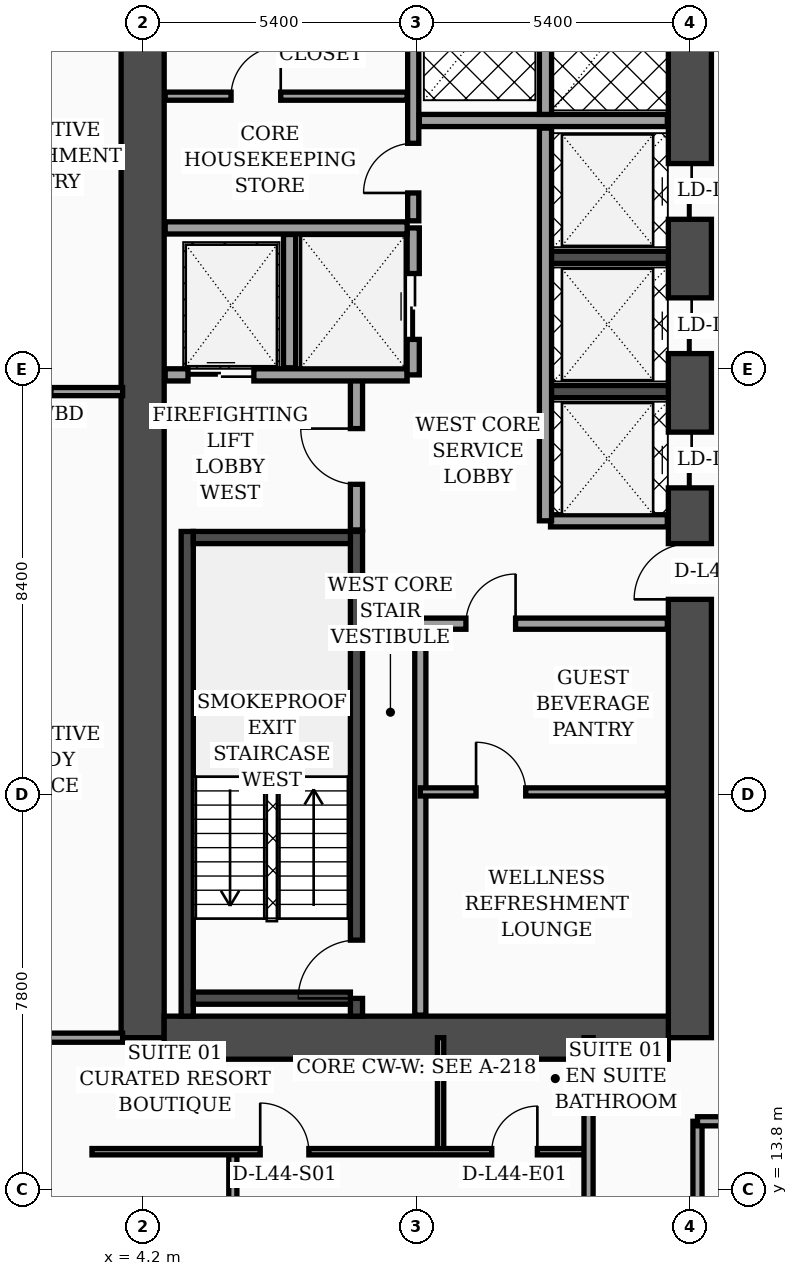
"""IFC4 building model, lengths in metres.
Left out: names, types, materials, properties, quantities, classifications, styles, units other than length and angle.
Written with IfcOpenShell. Run it as: python <this file> out.ifc"""

import sys

from ifc_helpers import new_model, si_unit, direction, frame, frame_2d, origin, place, context, subcontext, project, spatial, rectangle, extrude, element, fill, save


model = new_model("IFC4")
c1 = context("Model", 3, precision=1e-05, world=origin(), true_north=direction((0.0, 1.0)))
c2 = subcontext(c1, "Body", "Model", "MODEL_VIEW")
j1 = project(units=[si_unit("LENGTHUNIT", "METRE"), si_unit("PLANEANGLEUNIT", "RADIAN")], contexts=[c1])
p1 = place(None, origin())
s1 = spatial("IfcSite", under=j1, at=p1, CompositionType="ELEMENT")
p2 = place(p1, origin())
s2 = spatial("IfcBuilding", under=s1, at=p2, CompositionType="ELEMENT")
p3 = place(p2, frame((0.0, 0.0, 178.9)))
s3 = spatial("IfcBuildingStorey", under=s2, at=p3, CompositionType="ELEMENT", Elevation=178.9)
p4 = place(p3, frame((4.2, 16.8, 0.0), z_axis=(0.0, 0.0, 1.0), x_axis=(0.0, 1.0, 0.0)))
e1 = element("IfcWall", 1, at=p4, inside=s3, PredefinedType="SHEAR", context=c2, shape_type="SweptSolid", body=[
    extrude(rectangle(XDim=21.6, YDim=0.85, at=frame_2d((10.8, 0.0))), origin(), (0.0, 0.0, 1.0), 3.56),
])
p5 = place(p3, frame((15.0, 16.8, 0.0), z_axis=(0.0, 0.0, 1.0), x_axis=(0.0, 1.0, 0.0)))
e2 = element("IfcWall", 2, at=p5, inside=s3, PredefinedType="SHEAR", context=c2, shape_type="SweptSolid", body=[
    extrude(rectangle(XDim=21.6, YDim=0.85, at=frame_2d((10.8, 0.0))), origin(), (0.0, 0.0, 1.0), 3.56),
])
p6 = place(p5, frame((8.65, 0.0, 0.0)))
e3 = element("IfcOpeningElement", 3, at=p6, cuts=e2, PredefinedType="OPENING", context=c2, shape_type="SweptSolid", body=[
    extrude(rectangle(XDim=1.1, YDim=2.2, at=frame_2d((0.55, 1.1))), frame((0.0, 0.435, 0.0), z_axis=(0.0, -1.0, 0.0), x_axis=(1.0, 0.0, 0.0)), (0.0, 0.0, 1.0), 0.87),
])
p7 = place(p5, frame((10.85, 0.0, 0.0)))
e4 = element("IfcOpeningElement", 4, at=p7, cuts=e2, PredefinedType="OPENING", context=c2, shape_type="SweptSolid", body=[
    extrude(rectangle(XDim=1.1, YDim=2.2, at=frame_2d((0.55, 1.1))), frame((0.0, 0.435, 0.0), z_axis=(0.0, -1.0, 0.0), x_axis=(1.0, 0.0, 0.0)), (0.0, 0.0, 1.0), 0.87),
])
p8 = place(p5, frame((13.5, 0.0, 0.0)))
e5 = element("IfcOpeningElement", 5, at=p8, cuts=e2, PredefinedType="OPENING", context=c2, shape_type="SweptSolid", body=[
    extrude(rectangle(XDim=1.1, YDim=2.2, at=frame_2d((0.55, 1.1))), frame((0.0, 0.435, 0.0), z_axis=(0.0, -1.0, 0.0), x_axis=(1.0, 0.0, 0.0)), (0.0, 0.0, 1.0), 0.87),
])
p9 = place(p5, frame((16.15, 0.0, 0.0)))
e6 = element("IfcOpeningElement", 6, at=p9, cuts=e2, PredefinedType="OPENING", context=c2, shape_type="SweptSolid", body=[
    extrude(rectangle(XDim=1.1, YDim=2.2, at=frame_2d((0.55, 1.1))), frame((0.0, 0.435, 0.0), z_axis=(0.0, -1.0, 0.0), x_axis=(1.0, 0.0, 0.0)), (0.0, 0.0, 1.0), 0.87),
])
p10 = place(p3, frame((4.625, 16.8, 0.0), z_axis=(0.0, 0.0, 1.0), x_axis=(1.0, 0.0, 0.0)))
e7 = element("IfcWall", 7, at=p10, inside=s3, PredefinedType="SHEAR", context=c2, shape_type="SweptSolid", body=[
    extrude(rectangle(XDim=9.95, YDim=0.85, at=frame_2d((4.975, 0.0))), origin(), (0.0, 0.0, 1.0), 3.56),
])
p11 = place(p3, frame((5.08, 17.225, 0.0), z_axis=(0.0, 0.0, 1.0), x_axis=(0.0, 1.0, 0.0)))
e8 = element("IfcWall", 8, at=p11, inside=s3, PredefinedType="SOLIDWALL", context=c2, shape_type="SweptSolid", body=[
    extrude(rectangle(XDim=9.565, YDim=0.24, at=frame_2d((4.782, 0.0))), origin(), (0.0, 0.0, 1.0), 3.56),
])
p12 = place(p3, frame((8.42, 17.225, 0.0), z_axis=(0.0, 0.0, 1.0), x_axis=(0.0, 1.0, 0.0)))
e9 = element("IfcWall", 9, at=p12, inside=s3, PredefinedType="SOLIDWALL", context=c2, shape_type="SweptSolid", body=[
    extrude(rectangle(XDim=9.565, YDim=0.24, at=frame_2d((4.782, 0.0))), origin(), (0.0, 0.0, 1.0), 3.56),
])
p13 = place(p12, frame((0.35, 0.0, 0.0)))
e10 = element("IfcOpeningElement", 10, at=p13, cuts=e9, PredefinedType="OPENING", context=c2, shape_type="SweptSolid", body=[
    extrude(rectangle(XDim=1.15, YDim=2.2, at=frame_2d((0.575, 1.1))), frame((0.0, 0.13, 0.0), z_axis=(0.0, -1.0, 0.0), x_axis=(1.0, 0.0, 0.0)), (0.0, 0.0, 1.0), 0.26),
])
for number, where, z_axis, x_axis in (
    (11, (5.2, 17.58, 0.0), (0.0, 0.0, 1.0), (1.0, 0.0, 0.0)),
    (12, (5.2, 26.67, 0.0), (0.0, 0.0, 1.0), (1.0, 0.0, 0.0)),
):
    element("IfcWall", number, at=place(p3, frame(where, z_axis=z_axis, x_axis=x_axis)), inside=s3, PredefinedType="SOLIDWALL", context=c2, shape_type="SweptSolid", body=[
        extrude(rectangle(XDim=3.1, YDim=0.24, at=frame_2d((1.55, 0.0))), origin(), (0.0, 0.0, 1.0), 3.56),
    ])
for number, where, z_axis, x_axis in (
    (13, (12.18, 29.55, 0.0), (0.0, 0.0, 1.0), (1.0, 0.0, 0.0)),
    (14, (12.18, 32.2, 0.0), (0.0, 0.0, 1.0), (1.0, 0.0, 0.0)),
):
    element("IfcWall", number, at=place(p3, frame(where, z_axis=z_axis, x_axis=x_axis)), inside=s3, PredefinedType="SOLIDWALL", context=c2, shape_type="SweptSolid", body=[
        extrude(rectangle(XDim=2.395, YDim=0.24, at=frame_2d((1.198, 0.0))), origin(), (0.0, 0.0, 1.0), 3.56),
    ])
p14 = place(p3, frame((8.42, 26.82, 0.0), z_axis=(0.0, 0.0, 1.0), x_axis=(0.0, 1.0, 0.0)))
e15 = element("IfcWall", 15, at=p14, inside=s3, PredefinedType="SOLIDWALL", context=c2, shape_type="SweptSolid", body=[
    extrude(rectangle(XDim=3.0, YDim=0.24, at=frame_2d((1.5, 0.0))), origin(), (0.0, 0.0, 1.0), 3.56),
])
p15 = place(p14, frame((0.9, 0.0, 0.0)))
e16 = element("IfcOpeningElement", 16, at=p15, cuts=e15, PredefinedType="OPENING", context=c2, shape_type="SweptSolid", body=[
    extrude(rectangle(XDim=1.1, YDim=2.2, at=frame_2d((0.55, 1.1))), frame((0.0, 0.13, 0.0), z_axis=(0.0, -1.0, 0.0), x_axis=(1.0, 0.0, 0.0)), (0.0, 0.0, 1.0), 0.26),
])
p16 = place(p3, frame((4.645, 29.88, 0.0), z_axis=(0.0, 0.0, 1.0), x_axis=(1.0, 0.0, 0.0)))
e17 = element("IfcWall", 17, at=p16, inside=s3, PredefinedType="SOLIDWALL", context=c2, shape_type="SweptSolid", body=[
    extrude(rectangle(XDim=4.775, YDim=0.24, at=frame_2d((2.387, 0.0))), origin(), (0.0, 0.0, 1.0), 3.56),
])
p17 = place(p16, frame((0.45, 0.0, 0.0)))
e18 = element("IfcOpeningElement", 18, at=p17, cuts=e17, PredefinedType="OPENING", context=c2, shape_type="SweptSolid", body=[
    extrude(rectangle(XDim=1.3, YDim=2.35, at=frame_2d((0.65, 1.175))), frame((0.0, 0.13, 0.0), z_axis=(0.0, -1.0, 0.0), x_axis=(1.0, 0.0, 0.0)), (0.0, 0.0, 1.0), 0.26),
])
p18 = place(p3, frame((7.1, 30.02, 0.0), z_axis=(0.0, 0.0, 1.0), x_axis=(0.0, 1.0, 0.0)))
e19 = element("IfcWall", 19, at=p18, inside=s3, PredefinedType="SOLIDWALL", context=c2, shape_type="SweptSolid", body=[
    extrude(rectangle(XDim=2.63, YDim=0.24, at=frame_2d((1.315, 0.0))), origin(), (0.0, 0.0, 1.0), 3.56),
])
p19 = place(p3, frame((9.54, 29.88, 0.0), z_axis=(0.0, 0.0, 1.0), x_axis=(0.0, 1.0, 0.0)))
e20 = element("IfcWall", 20, at=p19, inside=s3, PredefinedType="SOLIDWALL", context=c2, shape_type="SweptSolid", body=[
    extrude(rectangle(XDim=2.9, YDim=0.24, at=frame_2d((1.45, 0.0))), origin(), (0.0, 0.0, 1.0), 3.56),
])
p20 = place(p19, frame((0.7, 0.0, 0.0)))
e21 = element("IfcOpeningElement", 21, at=p20, cuts=e20, PredefinedType="OPENING", context=c2, shape_type="SweptSolid", body=[
    extrude(rectangle(XDim=1.3, YDim=2.35, at=frame_2d((0.65, 1.175))), frame((0.0, 0.13, 0.0), z_axis=(0.0, -1.0, 0.0), x_axis=(1.0, 0.0, 0.0)), (0.0, 0.0, 1.0), 0.26),
])
p21 = place(p3, frame((4.645, 32.78, 0.0), z_axis=(0.0, 0.0, 1.0), x_axis=(1.0, 0.0, 0.0)))
e22 = element("IfcWall", 22, at=p21, inside=s3, PredefinedType="SOLIDWALL", context=c2, shape_type="SweptSolid", body=[
    extrude(rectangle(XDim=4.775, YDim=0.24, at=frame_2d((2.387, 0.0))), origin(), (0.0, 0.0, 1.0), 3.19),
])
p22 = place(p3, frame((9.68, 17.245, 0.0), z_axis=(0.0, 0.0, 1.0), x_axis=(0.0, 1.0, 0.0)))
e23 = element("IfcWall", 23, at=p22, inside=s3, PredefinedType="SOLIDWALL", context=c2, shape_type="SweptSolid", body=[
    extrude(rectangle(XDim=7.755, YDim=0.22, at=frame_2d((3.877, 0.0))), origin(), (0.0, 0.0, 1.0), 3.56),
])
p23 = place(p3, frame((4.645, 35.38, 0.0), z_axis=(0.0, 0.0, 1.0), x_axis=(1.0, 0.0, 0.0)))
e24 = element("IfcWall", 24, at=p23, inside=s3, PredefinedType="PARTITIONING", context=c2, shape_type="SweptSolid", body=[
    extrude(rectangle(XDim=4.775, YDim=0.16, at=frame_2d((2.387, 0.0))), origin(), (0.0, 0.0, 1.0), 3.56),
])
p24 = place(p23, frame((1.3, 0.0, 0.0)))
e25 = element("IfcOpeningElement", 25, at=p24, cuts=e24, PredefinedType="OPENING", context=c2, shape_type="SweptSolid", body=[
    extrude(rectangle(XDim=0.98, YDim=2.15, at=frame_2d((0.49, 1.075))), frame((0.0, 0.09, 0.0), z_axis=(0.0, -1.0, 0.0), x_axis=(1.0, 0.0, 0.0)), (0.0, 0.0, 1.0), 0.18),
])
p25 = place(p3, frame((9.54, 32.92, 0.0), z_axis=(0.0, 0.0, 1.0), x_axis=(0.0, 1.0, 0.0)))
e26 = element("IfcWall", 26, at=p25, inside=s3, PredefinedType="SOLIDWALL", context=c2, shape_type="SweptSolid", body=[
    extrude(rectangle(XDim=5.035, YDim=0.22, at=frame_2d((2.518, 0.0))), origin(), (0.0, 0.0, 1.0), 3.56),
])
p26 = place(p25, frame((0.55, 0.0, 0.0)))
e27 = element("IfcOpeningElement", 27, at=p26, cuts=e26, PredefinedType="OPENING", context=c2, shape_type="SweptSolid", body=[
    extrude(rectangle(XDim=0.98, YDim=2.15, at=frame_2d((0.49, 1.075))), frame((0.0, 0.12, 0.0), z_axis=(0.0, -1.0, 0.0), x_axis=(1.0, 0.0, 0.0)), (0.0, 0.0, 1.0), 0.24),
])
p27 = place(p3, frame((9.68, 21.65, 0.0), z_axis=(0.0, 0.0, 1.0), x_axis=(1.0, 0.0, 0.0)))
e28 = element("IfcWall", 28, at=p27, inside=s3, PredefinedType="PARTITIONING", context=c2, shape_type="SweptSolid", body=[
    extrude(rectangle(XDim=4.875, YDim=0.16, at=frame_2d((2.438, 0.0))), origin(), (0.0, 0.0, 1.0), 3.09),
])
p28 = place(p27, frame((1.1, 0.0, 0.0)))
e29 = element("IfcOpeningElement", 29, at=p28, cuts=e28, PredefinedType="OPENING", context=c2, shape_type="SweptSolid", body=[
    extrude(rectangle(XDim=0.98, YDim=2.15, at=frame_2d((0.49, 1.075))), frame((0.0, 0.09, 0.0), z_axis=(0.0, -1.0, 0.0), x_axis=(1.0, 0.0, 0.0)), (0.0, 0.0, 1.0), 0.18),
])
p29 = place(p3, frame((9.68, 24.97, 0.0), z_axis=(0.0, 0.0, 1.0), x_axis=(1.0, 0.0, 0.0)))
e30 = element("IfcWall", 30, at=p29, inside=s3, PredefinedType="SOLIDWALL", context=c2, shape_type="SweptSolid", body=[
    extrude(rectangle(XDim=4.875, YDim=0.22, at=frame_2d((2.438, 0.0))), origin(), (0.0, 0.0, 1.0), 2.94),
])
p30 = place(p29, frame((0.9, 0.0, 0.0)))
e31 = element("IfcOpeningElement", 31, at=p30, cuts=e30, PredefinedType="OPENING", context=c2, shape_type="SweptSolid", body=[
    extrude(rectangle(XDim=0.98, YDim=2.15, at=frame_2d((0.49, 1.075))), frame((0.0, 0.12, 0.0), z_axis=(0.0, -1.0, 0.0), x_axis=(1.0, 0.0, 0.0)), (0.0, 0.0, 1.0), 0.24),
])
p31 = place(p3, frame((12.25, 27.0, 0.0), z_axis=(0.0, 0.0, 1.0), x_axis=(1.0, 0.0, 0.0)))
e32 = element("IfcWall", 32, at=p31, inside=s3, PredefinedType="SOLIDWALL", context=c2, shape_type="SweptSolid", body=[
    extrude(rectangle(XDim=2.305, YDim=0.24, at=frame_2d((1.152, 0.0))), origin(), (0.0, 0.0, 1.0), 3.56),
])
p32 = place(p3, frame((12.15, 27.0, 0.0), z_axis=(0.0, 0.0, 1.0), x_axis=(0.0, 1.0, 0.0)))
e33 = element("IfcWall", 33, at=p32, inside=s3, PredefinedType="SOLIDWALL", context=c2, shape_type="SweptSolid", body=[
    extrude(rectangle(XDim=7.75, YDim=0.24, at=frame_2d((3.875, 0.0))), origin(), (0.0, 0.0, 1.0), 3.56),
])
p33 = place(p3, frame((9.66, 34.9, 0.0), z_axis=(0.0, 0.0, 1.0), x_axis=(1.0, 0.0, 0.0)))
e34 = element("IfcWall", 34, at=p33, inside=s3, PredefinedType="SOLIDWALL", context=c2, shape_type="SweptSolid", body=[
    extrude(rectangle(XDim=4.895, YDim=0.24, at=frame_2d((2.448, 0.0))), origin(), (0.0, 0.0, 1.0), 3.56),
])
p34 = place(p3, frame((12.15, 35.02, 0.0), z_axis=(0.0, 0.0, 1.0), x_axis=(0.0, 1.0, 0.0)))
e35 = element("IfcWall", 35, at=p34, inside=s3, PredefinedType="SOLIDWALL", context=c2, shape_type="SweptSolid", body=[
    extrude(rectangle(XDim=2.935, YDim=0.24, at=frame_2d((1.468, 0.0))), origin(), (0.0, 0.0, 1.0), 3.56),
])
p35 = place(p3, frame((0.08, 29.55, 0.0), z_axis=(0.0, 0.0, 1.0), x_axis=(1.0, 0.0, 0.0)))
e36 = element("IfcWall", 36, at=p35, inside=s3, PredefinedType="PARTITIONING", context=c2, shape_type="SweptSolid", body=[
    extrude(rectangle(XDim=3.725, YDim=0.16, at=frame_2d((1.862, 0.0))), origin(), (0.0, 0.0, 1.0), 3.04),
])
p36 = place(p35, frame((1.35, 0.0, 0.0)))
e37 = element("IfcOpeningElement", 37, at=p36, cuts=e36, PredefinedType="OPENING", context=c2, shape_type="SweptSolid", body=[
    extrude(rectangle(XDim=0.96, YDim=2.2, at=frame_2d((0.48, 1.1))), frame((0.0, 0.09, 0.0), z_axis=(0.0, -1.0, 0.0), x_axis=(1.0, 0.0, 0.0)), (0.0, 0.0, 1.0), 0.18),
])
p37 = place(p3, frame((0.08, 16.8, 0.0), z_axis=(0.0, 0.0, 1.0), x_axis=(1.0, 0.0, 0.0)))
e38 = element("IfcWall", 38, at=p37, inside=s3, PredefinedType="PARTITIONING", context=c2, shape_type="SweptSolid", body=[
    extrude(rectangle(XDim=3.725, YDim=0.18, at=frame_2d((1.862, 0.0))), origin(), (0.0, 0.0, 1.0), 2.94),
])
p38 = place(p3, frame((10.08, 14.55, 0.0), z_axis=(0.0, 0.0, 1.0), x_axis=(0.0, 1.0, 0.0)))
e39 = element("IfcWall", 39, at=p38, inside=s3, PredefinedType="PARTITIONING", context=c2, shape_type="SweptSolid", body=[
    extrude(rectangle(XDim=2.25, YDim=0.125, at=frame_2d((1.125, 0.0))), origin(), (0.0, 0.0, 1.0), 3.56),
])
p39 = place(p3, frame((5.98, 2.44, 0.0), z_axis=(0.0, 0.0, 1.0), x_axis=(0.0, 1.0, 0.0)))
e40 = element("IfcWall", 40, at=p39, inside=s3, PredefinedType="PARTITIONING", context=c2, shape_type="SweptSolid", body=[
    extrude(rectangle(XDim=12.11, YDim=0.16, at=frame_2d((6.055, 0.0))), origin(), (0.0, 0.0, 1.0), 3.04),
])
p40 = place(p39, frame((5.58, 0.0, 0.0)))
e41 = element("IfcOpeningElement", 41, at=p40, cuts=e40, PredefinedType="OPENING", context=c2, shape_type="SweptSolid", body=[
    extrude(rectangle(XDim=0.96, YDim=2.2, at=frame_2d((0.48, 1.1))), frame((0.0, 0.09, 0.0), z_axis=(0.0, -1.0, 0.0), x_axis=(1.0, 0.0, 0.0)), (0.0, 0.0, 1.0), 0.18),
])
p41 = place(p3, frame((3.2, 14.55, 0.0), z_axis=(0.0, 0.0, 1.0), x_axis=(1.0, 0.0, 0.0)))
e42 = element("IfcWall", 42, at=p41, inside=s3, PredefinedType="PARTITIONING", context=c2, shape_type="SweptSolid", body=[
    extrude(rectangle(XDim=9.8, YDim=0.125, at=frame_2d((4.9, 0.0))), origin(), (0.0, 0.0, 1.0), 2.94),
])
p42 = place(p41, frame((3.32, 0.0, 0.0)))
e43 = element("IfcOpeningElement", 43, at=p42, cuts=e42, PredefinedType="OPENING", context=c2, shape_type="SweptSolid", body=[
    extrude(rectangle(XDim=0.96, YDim=2.2, at=frame_2d((0.48, 1.1))), frame((0.0, 0.073, 0.0), z_axis=(0.0, -1.0, 0.0), x_axis=(1.0, 0.0, 0.0)), (0.0, 0.0, 1.0), 0.145),
])
p43 = place(p41, frame((7.89, 0.0, 0.0)))
e44 = element("IfcOpeningElement", 44, at=p43, cuts=e42, PredefinedType="OPENING", context=c2, shape_type="SweptSolid", body=[
    extrude(rectangle(XDim=0.9, YDim=2.15, at=frame_2d((0.45, 1.075))), frame((0.0, 0.073, 0.0), z_axis=(0.0, -1.0, 0.0), x_axis=(1.0, 0.0, 0.0)), (0.0, 0.0, 1.0), 0.145),
])
p44 = place(p3, frame((13.0, 2.44, 0.0), z_axis=(0.0, 0.0, 1.0), x_axis=(0.0, 1.0, 0.0)))
e45 = element("IfcWall", 45, at=p44, inside=s3, PredefinedType="PARTITIONING", context=c2, shape_type="SweptSolid", body=[
    extrude(rectangle(XDim=14.36, YDim=0.18, at=frame_2d((7.18, 0.0))), origin(), (0.0, 0.0, 1.0), 2.94),
])
p45 = place(p44, frame((3.01, 0.0, 0.0)))
e46 = element("IfcOpeningElement", 46, at=p45, cuts=e45, PredefinedType="OPENING", context=c2, shape_type="SweptSolid", body=[
    extrude(rectangle(XDim=1.02, YDim=2.2, at=frame_2d((0.51, 1.1))), frame((0.0, 0.1, 0.0), z_axis=(0.0, -1.0, 0.0), x_axis=(1.0, 0.0, 0.0)), (0.0, 0.0, 1.0), 0.2),
])
p46 = place(p3, frame((15.15, 2.44, 0.0), z_axis=(0.0, 0.0, 1.0), x_axis=(0.0, 1.0, 0.0)))
e47 = element("IfcWall", 47, at=p46, inside=s3, PredefinedType="PARTITIONING", context=c2, shape_type="SweptSolid", body=[
    extrude(rectangle(XDim=12.71, YDim=0.18, at=frame_2d((6.355, 0.0))), origin(), (0.0, 0.0, 1.0), 3.04),
])
p47 = place(p3, frame((15.15, 15.15, 0.0), z_axis=(0.0, 0.0, 1.0), x_axis=(1.0, 0.0, 0.0)))
e48 = element("IfcWall", 48, at=p47, inside=s3, PredefinedType="PARTITIONING", context=c2, shape_type="SweptSolid", body=[
    extrude(rectangle(XDim=6.45, YDim=0.18, at=frame_2d((3.225, 0.0))), origin(), (0.0, 0.0, 1.0), 2.49),
])
p48 = place(p47, frame((1.74, 0.0, 0.0)))
e49 = element("IfcOpeningElement", 49, at=p48, cuts=e48, PredefinedType="OPENING", context=c2, shape_type="SweptSolid", body=[
    extrude(rectangle(XDim=1.02, YDim=2.2, at=frame_2d((0.51, 1.1))), frame((0.0, 0.1, 0.0), z_axis=(0.0, -1.0, 0.0), x_axis=(1.0, 0.0, 0.0)), (0.0, 0.0, 1.0), 0.2),
])
p49 = place(p15, origin())
e50 = element("IfcDoor", 50, at=p49, inside=s3, OperationType="SINGLE_SWING_RIGHT", PredefinedType="DOOR", context=c2, shape_type="SweptSolid", body=[
    extrude(rectangle(XDim=1.1, YDim=2.2, at=frame_2d((0.55, 1.1))), frame((0.0, 0.025, 0.0), z_axis=(0.0, -1.0, 0.0), x_axis=(1.0, 0.0, 0.0)), (0.0, 0.0, 1.0), 0.05),
])
fill(e16, e50)
p50 = place(p17, origin())
e51 = element("IfcDoor", 51, at=p50, inside=s3, OperationType="DOUBLE_DOOR_SLIDING", PredefinedType="DOOR", context=c2, shape_type="SweptSolid", body=[
    extrude(rectangle(XDim=1.3, YDim=2.35, at=frame_2d((0.65, 1.175))), frame((0.0, 0.025, 0.0), z_axis=(0.0, -1.0, 0.0), x_axis=(1.0, 0.0, 0.0)), (0.0, 0.0, 1.0), 0.05),
])
fill(e18, e51)
p51 = place(p20, origin())
e52 = element("IfcDoor", 52, at=p51, inside=s3, OperationType="DOUBLE_DOOR_SLIDING", PredefinedType="DOOR", context=c2, shape_type="SweptSolid", body=[
    extrude(rectangle(XDim=1.3, YDim=2.35, at=frame_2d((0.65, 1.175))), frame((0.0, 0.025, 0.0), z_axis=(0.0, -1.0, 0.0), x_axis=(1.0, 0.0, 0.0)), (0.0, 0.0, 1.0), 0.05),
])
fill(e21, e52)
p52 = place(p24, origin())
e53 = element("IfcDoor", 53, at=p52, inside=s3, OperationType="SINGLE_SWING_RIGHT", PredefinedType="DOOR", context=c2, shape_type="SweptSolid", body=[
    extrude(rectangle(XDim=0.98, YDim=2.15, at=frame_2d((0.49, 1.075))), frame((0.0, 0.025, 0.0), z_axis=(0.0, -1.0, 0.0), x_axis=(1.0, 0.0, 0.0)), (0.0, 0.0, 1.0), 0.05),
])
fill(e25, e53)
p53 = place(p26, origin())
e54 = element("IfcDoor", 54, at=p53, inside=s3, OperationType="SINGLE_SWING_LEFT", PredefinedType="DOOR", context=c2, shape_type="SweptSolid", body=[
    extrude(rectangle(XDim=0.98, YDim=2.15, at=frame_2d((0.49, 1.075))), frame((0.0, 0.025, 0.0), z_axis=(0.0, -1.0, 0.0), x_axis=(1.0, 0.0, 0.0)), (0.0, 0.0, 1.0), 0.05),
])
fill(e27, e54)
p54 = place(p28, origin())
e55 = element("IfcDoor", 55, at=p54, inside=s3, OperationType="SINGLE_SWING_LEFT", PredefinedType="DOOR", context=c2, shape_type="SweptSolid", body=[
    extrude(rectangle(XDim=0.98, YDim=2.15, at=frame_2d((0.49, 1.075))), frame((0.0, 0.025, 0.0), z_axis=(0.0, -1.0, 0.0), x_axis=(1.0, 0.0, 0.0)), (0.0, 0.0, 1.0), 0.05),
])
fill(e29, e55)
p55 = place(p30, origin())
e56 = element("IfcDoor", 56, at=p55, inside=s3, OperationType="SINGLE_SWING_RIGHT", PredefinedType="DOOR", context=c2, shape_type="SweptSolid", body=[
    extrude(rectangle(XDim=0.98, YDim=2.15, at=frame_2d((0.49, 1.075))), frame((0.0, 0.025, 0.0), z_axis=(0.0, -1.0, 0.0), x_axis=(1.0, 0.0, 0.0)), (0.0, 0.0, 1.0), 0.05),
])
fill(e31, e56)
p56 = place(p42, origin())
e57 = element("IfcDoor", 57, at=p56, inside=s3, OperationType="SINGLE_SWING_LEFT", PredefinedType="DOOR", context=c2, shape_type="SweptSolid", body=[
    extrude(rectangle(XDim=0.96, YDim=2.2, at=frame_2d((0.48, 1.1))), frame((0.0, 0.025, 0.0), z_axis=(0.0, -1.0, 0.0), x_axis=(1.0, 0.0, 0.0)), (0.0, 0.0, 1.0), 0.05),
])
fill(e43, e57)
p57 = place(p43, origin())
e58 = element("IfcDoor", 58, at=p57, inside=s3, OperationType="SINGLE_SWING_RIGHT", PredefinedType="DOOR", context=c2, shape_type="SweptSolid", body=[
    extrude(rectangle(XDim=0.9, YDim=2.15, at=frame_2d((0.45, 1.075))), frame((0.0, 0.025, 0.0), z_axis=(0.0, -1.0, 0.0), x_axis=(1.0, 0.0, 0.0)), (0.0, 0.0, 1.0), 0.05),
])
fill(e44, e58)
p58 = place(p13, origin())
e59 = element("IfcDoor", 59, at=p58, inside=s3, OperationType="SINGLE_SWING_LEFT", PredefinedType="DOOR", context=c2, shape_type="SweptSolid", body=[
    extrude(rectangle(XDim=1.15, YDim=2.2, at=frame_2d((0.575, 1.1))), frame((0.0, 0.025, 0.0), z_axis=(0.0, -1.0, 0.0), x_axis=(1.0, 0.0, 0.0)), (0.0, 0.0, 1.0), 0.05),
])
fill(e10, e59)
p59 = place(p6, origin())
e60 = element("IfcDoor", 60, at=p59, inside=s3, OperationType="SINGLE_SWING_LEFT", PredefinedType="DOOR", context=c2, shape_type="SweptSolid", body=[
    extrude(rectangle(XDim=1.1, YDim=2.2, at=frame_2d((0.55, 1.1))), frame((0.0, 0.025, 0.0), z_axis=(0.0, -1.0, 0.0), x_axis=(1.0, 0.0, 0.0)), (0.0, 0.0, 1.0), 0.05),
])
fill(e3, e60)
p60 = place(p7, origin())
e61 = element("IfcDoor", 61, at=p60, inside=s3, OperationType="DOUBLE_DOOR_SLIDING", PredefinedType="DOOR", context=c2, shape_type="SweptSolid", body=[
    extrude(rectangle(XDim=1.1, YDim=2.2, at=frame_2d((0.55, 1.1))), frame((0.0, 0.025, 0.0), z_axis=(0.0, -1.0, 0.0), x_axis=(1.0, 0.0, 0.0)), (0.0, 0.0, 1.0), 0.05),
])
fill(e4, e61)
p61 = place(p8, origin())
e62 = element("IfcDoor", 62, at=p61, inside=s3, OperationType="DOUBLE_DOOR_SLIDING", PredefinedType="DOOR", context=c2, shape_type="SweptSolid", body=[
    extrude(rectangle(XDim=1.1, YDim=2.2, at=frame_2d((0.55, 1.1))), frame((0.0, 0.025, 0.0), z_axis=(0.0, -1.0, 0.0), x_axis=(1.0, 0.0, 0.0)), (0.0, 0.0, 1.0), 0.05),
])
fill(e5, e62)
p62 = place(p9, origin())
e63 = element("IfcDoor", 63, at=p62, inside=s3, OperationType="DOUBLE_DOOR_SLIDING", PredefinedType="DOOR", context=c2, shape_type="SweptSolid", body=[
    extrude(rectangle(XDim=1.1, YDim=2.2, at=frame_2d((0.55, 1.1))), frame((0.0, 0.025, 0.0), z_axis=(0.0, -1.0, 0.0), x_axis=(1.0, 0.0, 0.0)), (0.0, 0.0, 1.0), 0.05),
])
fill(e6, e63)
save(model, sys.argv[1])
